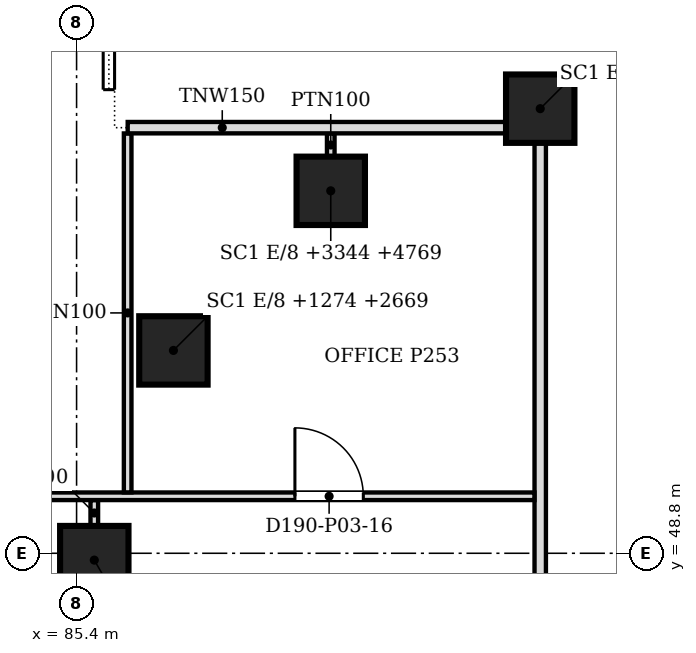
"""IFC4 building model, lengths in metres.
Left out: names, types, materials, properties, quantities, classifications, styles, units other than length and angle.
Written with IfcOpenShell. Run it as: python <this file> out.ifc"""

import sys

from ifc_helpers import new_model, si_unit, direction, frame, frame_2d, origin, origin_2d, place, context, subcontext, project, spatial, rectangle, extrude, source, transform, mapped, element, fill, save


model = new_model("IFC4")
c1 = context("Model", 3, precision=1e-05, world=origin(), true_north=direction((0.0, 1.0)))
c2 = subcontext(c1, "Body", "Model", "MODEL_VIEW")
j1 = project(units=[si_unit("LENGTHUNIT", "METRE"), si_unit("PLANEANGLEUNIT", "RADIAN")], contexts=[c1])
p1 = place(None, origin())
s1 = spatial("IfcSite", under=j1, at=p1, CompositionType="ELEMENT")
p2 = place(p1, origin())
s2 = spatial("IfcBuilding", under=s1, at=p2, CompositionType="ELEMENT")
p3 = place(p2, frame((0.0, 0.0, 12.0)))
s3 = spatial("IfcBuildingStorey", under=s2, at=p3, CompositionType="ELEMENT", Elevation=12.0)
for number, where, z_axis, x_axis in (
    (1, (91.5, 54.65, 0.0), (0.0, 0.0, 1.0), (1.0, 0.0, 0.0)),
    (2, (88.744, 53.569, 0.0), (0.0, 0.0, 1.0), (1.0, 0.0, 0.0)),
    (3, (86.674, 51.469, 0.0), (0.0, 0.0, 1.0), (1.0, 0.0, 0.0)),
    (4, (85.633, 48.71, 0.0), (0.0, 0.0, 1.0), (1.0, 0.0, 0.0)),
):
    element("IfcColumn", number, at=place(p3, frame(where, z_axis=z_axis, x_axis=x_axis)), inside=s3, PredefinedType="COLUMN", context=c2, shape_type="SweptSolid", body=[
        extrude(rectangle(XDim=0.9, YDim=0.9, at=origin_2d()), origin(), (0.0, 0.0, 1.0), 4.6),
    ])
p4 = place(p3, frame((85.4, 54.2, 0.0), z_axis=(0.0, 0.0, 1.0), x_axis=(1.0, 0.0, 0.0)))
e5 = element("IfcColumn", 5, at=p4, inside=s3, PredefinedType="COLUMN", context=c2, shape_type="SweptSolid", body=[
    extrude(rectangle(XDim=0.9, YDim=0.9, at=origin_2d()), origin(), (0.0, 0.0, 1.0), 4.35),
])
p5 = place(p3, frame((91.5, 35.476, 0.0), z_axis=(0.0, 0.0, 1.0), x_axis=(0.0, 1.0, 0.0)))
e6 = element("IfcWall", 6, at=p5, inside=s3, PredefinedType="PARTITIONING", context=c2, shape_type="SweptSolid", body=[
    extrude(rectangle(XDim=18.723, YDim=0.15, at=frame_2d((9.361, 0.0))), origin(), (0.0, 0.0, 1.0), 3.672),
])
p6 = place(p3, frame((85.633, 49.16, 0.0), z_axis=(0.0, 0.0, 1.0), x_axis=(0.0, 1.0, 0.0)))
e7 = element("IfcWall", 7, at=p6, inside=s3, PredefinedType="PARTITIONING", context=c2, shape_type="SweptSolid", body=[
    extrude(rectangle(XDim=0.34, YDim=0.1, at=frame_2d((0.17, 0.0))), origin(), (0.0, 0.0, 1.0), 3.672),
])
p7 = place(p3, frame((81.076, 49.55, 0.0), z_axis=(0.0, 0.0, 1.0), x_axis=(1.0, 0.0, 0.0)))
e8 = element("IfcWall", 8, at=p7, inside=s3, PredefinedType="PARTITIONING", context=c2, shape_type="SweptSolid", body=[
    extrude(rectangle(XDim=10.348, YDim=0.1, at=frame_2d((5.174, 0.0))), origin(), (0.0, 0.0, 1.0), 3.672),
])
m1 = source(origin(), c2, "Body", "SweptSolid", [
    extrude(rectangle(XDim=0.9, YDim=2.1, at=frame_2d((0.45, 1.05))), frame((0.0, 0.06, 0.0), z_axis=(0.0, -1.0, 0.0), x_axis=(1.0, 0.0, 0.0)), (0.0, 0.0, 1.0), 0.12),
])
p8 = place(p7, frame((2.0, 0.0, 0.0)))
e9 = element("IfcOpeningElement", 9, at=p8, cuts=e8, PredefinedType="OPENING", context=c2, shape_type="MappedRepresentation", body=[
    mapped(m1, transform((0.0, 0.0, 0.0), scale=1.0)),
])
p9 = place(p7, frame((7.197, 0.0, 0.0)))
e10 = element("IfcOpeningElement", 10, at=p9, cuts=e8, PredefinedType="OPENING", context=c2, shape_type="MappedRepresentation", body=[
    mapped(m1, transform((0.0, 0.0, 0.0), scale=1.0)),
])
p10 = place(p3, frame((86.072, 49.601, 0.0), z_axis=(0.0, 0.0, 1.0), x_axis=(0.0, 1.0, 0.0)))
e11 = element("IfcWall", 11, at=p10, inside=s3, PredefinedType="PARTITIONING", context=c2, shape_type="SweptSolid", body=[
    extrude(rectangle(XDim=4.723, YDim=0.1, at=frame_2d((2.361, 0.0))), origin(), (0.0, 0.0, 1.0), 3.672),
])
p11 = place(p3, frame((88.744, 54.019, 0.0), z_axis=(0.0, 0.0, 1.0), x_axis=(0.0, 1.0, 0.0)))
e12 = element("IfcWall", 12, at=p11, inside=s3, PredefinedType="PARTITIONING", context=c2, shape_type="SweptSolid", body=[
    extrude(rectangle(XDim=0.306, YDim=0.1, at=frame_2d((0.153, 0.0))), origin(), (0.0, 0.0, 1.0), 3.672),
])
p12 = place(p3, frame((86.073, 54.4, 0.0), z_axis=(0.0, 0.0, 1.0), x_axis=(1.0, 0.0, 0.0)))
e13 = element("IfcWall", 13, at=p12, inside=s3, PredefinedType="PARTITIONING", context=c2, shape_type="SweptSolid", body=[
    extrude(rectangle(XDim=4.977, YDim=0.15, at=frame_2d((2.488, 0.0))), origin(), (0.0, 0.0, 1.0), 3.672),
])
m2 = source(origin(), c2, "Body", "SweptSolid", [
    extrude(rectangle(XDim=0.9, YDim=2.1, at=frame_2d((0.45, 1.05))), frame((0.0, 0.025, 0.0), z_axis=(0.0, -1.0, 0.0), x_axis=(1.0, 0.0, 0.0)), (0.0, 0.0, 1.0), 0.05),
])
p13 = place(p9, origin())
e14 = element("IfcDoor", 14, at=p13, inside=s3, OperationType="SINGLE_SWING_LEFT", PredefinedType="DOOR", context=c2, shape_type="MappedRepresentation", body=[
    mapped(m2, transform((0.0, 0.0, 0.0), scale=1.0)),
])
fill(e10, e14)
save(model, sys.argv[1])
